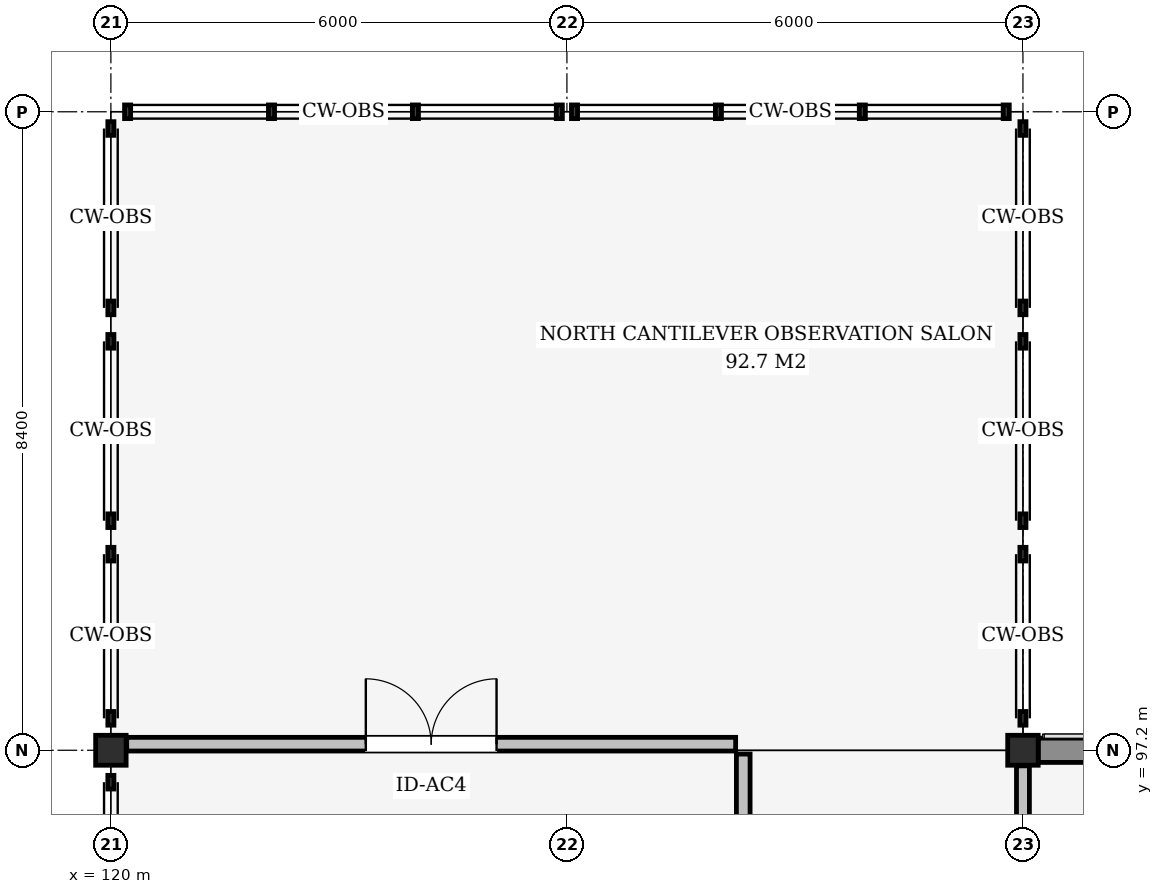
"""IFC4 building model, lengths in metres.
Left out: names, types, materials, properties, quantities, classifications, styles, units other than length and angle.
Written with IfcOpenShell. Run it as: python <this file> out.ifc"""

import sys

from ifc_helpers import new_model, si_unit, direction, frame, frame_2d, origin, origin_2d, place, context, subcontext, project, spatial, rectangle, i_section, extrude, element, fill, save


model = new_model("IFC4")
c1 = context("Model", 3, precision=1e-05, world=origin(), true_north=direction((0.0, 1.0)))
c2 = subcontext(c1, "Body", "Model", "MODEL_VIEW")
j1 = project(units=[si_unit("LENGTHUNIT", "METRE"), si_unit("PLANEANGLEUNIT", "RADIAN")], contexts=[c1])
p1 = place(None, origin())
s1 = spatial("IfcSite", under=j1, at=p1, CompositionType="ELEMENT")
p2 = place(p1, origin())
s2 = spatial("IfcBuilding", under=s1, at=p2, CompositionType="ELEMENT")
p3 = place(p2, frame((0.0, 0.0, 13.8)))
s3 = spatial("IfcBuildingStorey", under=s2, at=p3, CompositionType="ELEMENT", Elevation=13.8)
p4 = place(p3, frame((120.0, 97.2, 0.0), z_axis=(0.0, 0.0, 1.0), x_axis=(1.0, 0.0, 0.0)))
e1 = element("IfcColumn", 1, at=p4, inside=s3, PredefinedType="COLUMN", context=c2, shape_type="SweptSolid", body=[
    extrude(i_section(OverallWidth=0.401, OverallDepth=0.394, WebThickness=0.023, FlangeThickness=0.037, at=origin_2d()), origin(), (0.0, 0.0, 1.0), 4.22),
])
p5 = place(p3, frame((132.0, 97.2, 0.0), z_axis=(0.0, 0.0, 1.0), x_axis=(1.0, 0.0, 0.0)))
e2 = element("IfcColumn", 2, at=p5, inside=s3, PredefinedType="COLUMN", context=c2, shape_type="SweptSolid", body=[
    extrude(i_section(OverallWidth=0.401, OverallDepth=0.394, WebThickness=0.023, FlangeThickness=0.037, at=origin_2d()), origin(), (0.0, 0.0, 1.0), 4.5),
])
p6 = place(p3, frame((132.2, 97.2, 0.0), z_axis=(0.0, 0.0, 1.0), x_axis=(1.0, 0.0, 0.0)))
e3 = element("IfcWall", 3, at=p6, inside=s3, PredefinedType="SOLIDWALL", context=c2, shape_type="SweptSolid", body=[
    extrude(rectangle(XDim=11.475, YDim=0.32, at=frame_2d((5.737, 0.0))), origin(), (0.0, 0.0, 1.0), 3.944),
])
p7 = place(p6, frame((4.237, 0.0, 0.6)))
e4 = element("IfcOpeningElement", 4, at=p7, cuts=e3, PredefinedType="OPENING", context=c2, shape_type="SweptSolid", body=[
    extrude(rectangle(XDim=3.0, YDim=2.1, at=frame_2d((1.5, 1.05))), frame((0.0, 0.17, 0.0), z_axis=(0.0, -1.0, 0.0), x_axis=(1.0, 0.0, 0.0)), (0.0, 0.0, 1.0), 0.34),
])
p8 = place(p3, frame((128.32, 73.85, 0.0), z_axis=(0.0, 0.0, 1.0), x_axis=(0.0, 1.0, 0.0)))
e5 = element("IfcWall", 5, at=p8, inside=s3, PredefinedType="PARTITIONING", context=c2, shape_type="SweptSolid", body=[
    extrude(rectangle(XDim=23.3, YDim=0.18, at=frame_2d((11.65, 0.0))), origin(), (0.0, 0.0, 1.0), 4.2),
])
p9 = place(p8, frame((10.79, 0.0, 0.0)))
e6 = element("IfcOpeningElement", 6, at=p9, cuts=e5, PredefinedType="OPENING", context=c2, shape_type="SweptSolid", body=[
    extrude(rectangle(XDim=1.72, YDim=2.34, at=frame_2d((0.86, 1.17))), frame((0.0, 0.1, 0.0), z_axis=(0.0, -1.0, 0.0), x_axis=(1.0, 0.0, 0.0)), (0.0, 0.0, 1.0), 0.2),
])
p10 = place(p3, frame((132.0, 93.148, 0.0), z_axis=(0.0, 0.0, 1.0), x_axis=(0.0, 1.0, 0.0)))
e7 = element("IfcWall", 7, at=p10, inside=s3, PredefinedType="PARTITIONING", context=c2, shape_type="SweptSolid", body=[
    extrude(rectangle(XDim=3.847, YDim=0.17, at=frame_2d((1.924, 0.0))), origin(), (0.0, 0.0, 1.0), 3.801),
])
p11 = place(p3, frame((120.208, 97.28, 0.0), z_axis=(0.0, 0.0, 1.0), x_axis=(1.0, 0.0, 0.0)))
e8 = element("IfcWall", 8, at=p11, inside=s3, PredefinedType="PARTITIONING", context=c2, shape_type="SweptSolid", body=[
    extrude(rectangle(XDim=8.011, YDim=0.18, at=frame_2d((4.006, 0.0))), origin(), (0.0, 0.0, 1.0), 3.438),
])
p12 = place(p11, frame((3.146, 0.0, 0.0)))
e9 = element("IfcOpeningElement", 9, at=p12, cuts=e8, PredefinedType="OPENING", context=c2, shape_type="SweptSolid", body=[
    extrude(rectangle(XDim=1.72, YDim=2.34, at=frame_2d((0.86, 1.17))), frame((0.0, 0.1, 0.0), z_axis=(0.0, -1.0, 0.0), x_axis=(1.0, 0.0, 0.0)), (0.0, 0.0, 1.0), 0.2),
])
p13 = place(p12, origin())
e10 = element("IfcDoor", 10, at=p13, inside=s3, OperationType="DOUBLE_DOOR_SINGLE_SWING", PredefinedType="DOOR", context=c2, shape_type="SweptSolid", body=[
    extrude(rectangle(XDim=1.72, YDim=2.34, at=frame_2d((0.86, 1.17))), frame((0.0, 0.025, 0.0), z_axis=(0.0, -1.0, 0.0), x_axis=(1.0, 0.0, 0.0)), (0.0, 0.0, 1.0), 0.05),
])
fill(e9, e10)
save(model, sys.argv[1])
